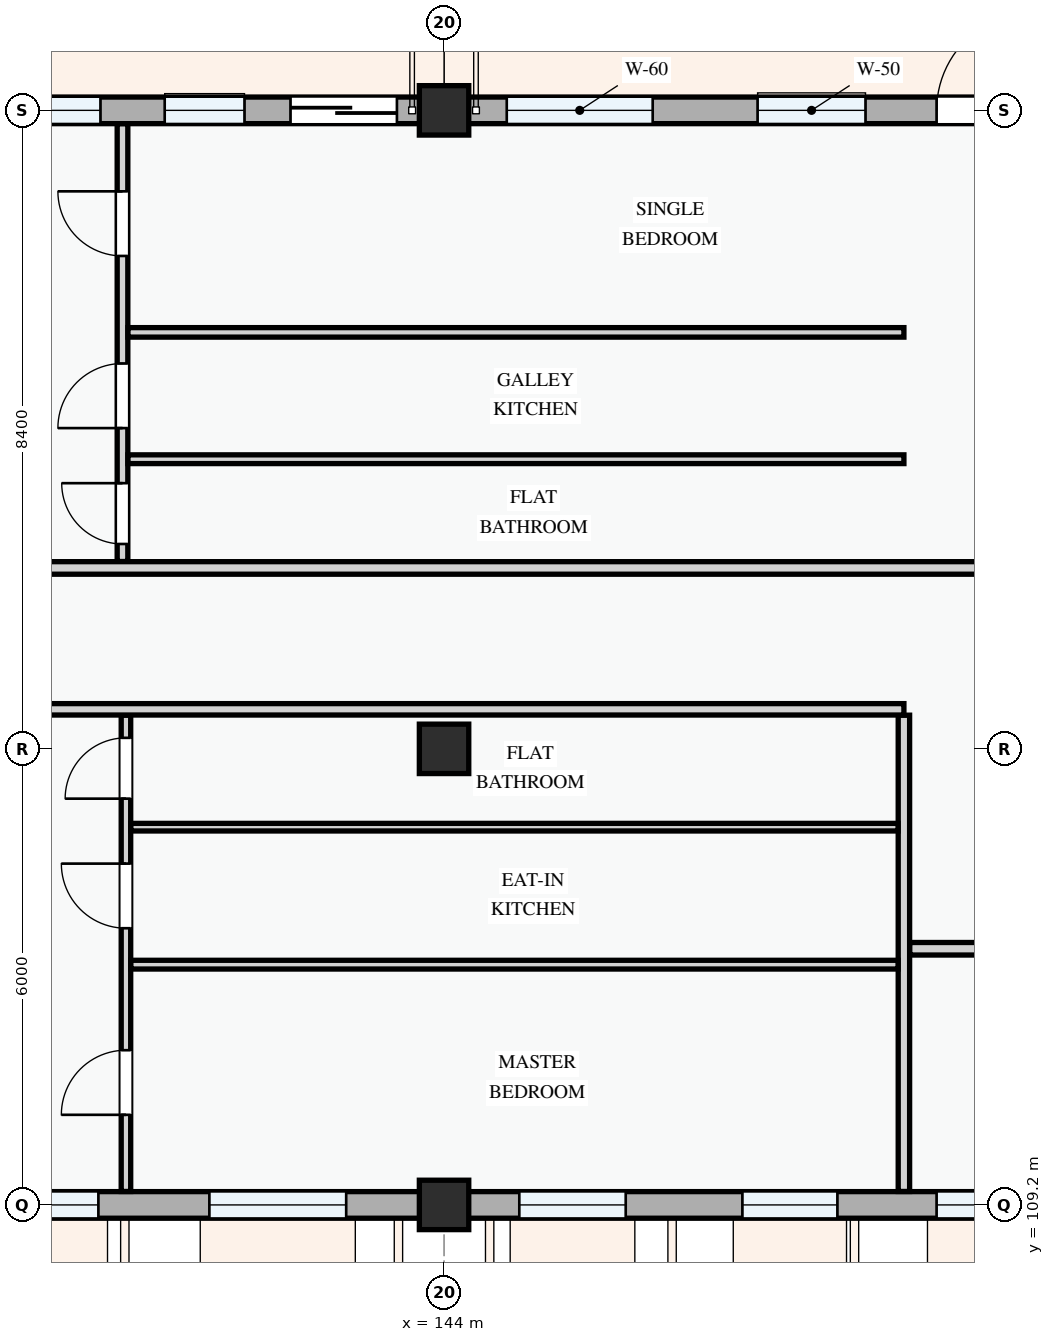
"""IFC4 building model, lengths in metres.
Left out: names, types, materials, properties, quantities, classifications, styles, units other than length and angle.
Written with IfcOpenShell. Run it as: python <this file> out.ifc"""

import sys

from ifc_helpers import new_model, si_unit, direction, frame, frame_2d, origin, origin_2d, place, context, subcontext, project, spatial, rectangle, extrude, element, fill, save


model = new_model("IFC4")
c1 = context("Model", 3, precision=1e-05, world=origin(), true_north=direction((0.0, 1.0)))
c2 = subcontext(c1, "Body", "Model", "MODEL_VIEW")
j1 = project(units=[si_unit("LENGTHUNIT", "METRE"), si_unit("PLANEANGLEUNIT", "RADIAN")], contexts=[c1])
p1 = place(None, origin())
s1 = spatial("IfcSite", under=j1, at=p1, CompositionType="ELEMENT")
p2 = place(p1, origin())
s2 = spatial("IfcBuilding", under=s1, at=p2, CompositionType="ELEMENT")
p3 = place(p2, frame((0.0, 0.0, 11.4)))
s3 = spatial("IfcBuildingStorey", under=s2, at=p3, CompositionType="ELEMENT", Elevation=11.4)
for number, where, z_axis, x_axis in (
    (1, (144.0, 109.2, 0.0), (0.0, 0.0, 1.0), (1.0, 0.0, 0.0)),
    (2, (144.0, 115.2, 0.0), (0.0, 0.0, 1.0), (1.0, 0.0, 0.0)),
    (3, (144.0, 123.6, 0.0), (0.0, 0.0, 1.0), (1.0, 0.0, 0.0)),
):
    element("IfcColumn", number, at=place(p3, frame(where, z_axis=z_axis, x_axis=x_axis)), inside=s3, PredefinedType="COLUMN", context=c2, shape_type="SweptSolid", body=[
        extrude(rectangle(XDim=0.65, YDim=0.65, at=origin_2d()), origin(), (0.0, 0.0, 1.0), 3.3),
    ])
p4 = place(p3, frame((152.4, 123.6, 0.0), z_axis=(0.0, 0.0, 1.0), x_axis=(-1.0, 0.0, 0.0)))
e4 = element("IfcWall", 4, at=p4, inside=s3, PredefinedType="STANDARD", context=c2, shape_type="SweptSolid", body=[
    extrude(rectangle(XDim=8.4, YDim=0.35, at=frame_2d((4.2, 0.0))), origin(), (0.0, 0.0, 1.0), 2.375),
])
p5 = place(p4, frame((0.62, 0.0, 0.0)))
e5 = element("IfcOpeningElement", 5, at=p5, cuts=e4, PredefinedType="OPENING", context=c2, shape_type="SweptSolid", body=[
    extrude(rectangle(XDim=1.3, YDim=2.15, at=frame_2d((0.65, 1.075))), frame((0.0, 0.185, 0.0), z_axis=(0.0, -1.0, 0.0), x_axis=(1.0, 0.0, 0.0)), (0.0, 0.0, 1.0), 0.37),
])
p6 = place(p4, frame((2.855, 0.0, 0.78)))
e6 = element("IfcOpeningElement", 6, at=p6, cuts=e4, PredefinedType="OPENING", context=c2, shape_type="SweptSolid", body=[
    extrude(rectangle(XDim=1.42, YDim=1.38, at=frame_2d((0.71, 0.69))), frame((0.0, 0.185, 0.0), z_axis=(0.0, -1.0, 0.0), x_axis=(1.0, 0.0, 0.0)), (0.0, 0.0, 1.0), 0.37),
])
p7 = place(p4, frame((5.655, 0.0, 0.78)))
e7 = element("IfcOpeningElement", 7, at=p7, cuts=e4, PredefinedType="OPENING", context=c2, shape_type="SweptSolid", body=[
    extrude(rectangle(XDim=1.92, YDim=1.44, at=frame_2d((0.96, 0.72))), frame((0.0, 0.185, 0.0), z_axis=(0.0, -1.0, 0.0), x_axis=(1.0, 0.0, 0.0)), (0.0, 0.0, 1.0), 0.37),
])
p8 = place(p3, frame((144.0, 123.6, 0.0), z_axis=(0.0, 0.0, 1.0), x_axis=(-1.0, 0.0, 0.0)))
e8 = element("IfcWall", 8, at=p8, inside=s3, PredefinedType="STANDARD", context=c2, shape_type="SweptSolid", body=[
    extrude(rectangle(XDim=6.0, YDim=0.35, at=frame_2d((3.0, 0.0))), origin(), (0.0, 0.0, 1.0), 2.475),
])
p9 = place(p8, frame((0.62, 0.0, 0.0)))
e9 = element("IfcOpeningElement", 9, at=p9, cuts=e8, PredefinedType="OPENING", context=c2, shape_type="SweptSolid", body=[
    extrude(rectangle(XDim=1.4, YDim=2.2, at=frame_2d((0.7, 1.1))), frame((0.0, 0.185, 0.0), z_axis=(0.0, -1.0, 0.0), x_axis=(1.0, 0.0, 0.0)), (0.0, 0.0, 1.0), 0.37),
])
p10 = place(p8, frame((2.625, 0.0, 0.78)))
e10 = element("IfcOpeningElement", 10, at=p10, cuts=e8, PredefinedType="OPENING", context=c2, shape_type="SweptSolid", body=[
    extrude(rectangle(XDim=1.05, YDim=1.2, at=frame_2d((0.525, 0.6))), frame((0.0, 0.185, 0.0), z_axis=(0.0, -1.0, 0.0), x_axis=(1.0, 0.0, 0.0)), (0.0, 0.0, 1.0), 0.37),
])
p11 = place(p8, frame((4.52, 0.0, 0.78)))
e11 = element("IfcOpeningElement", 11, at=p11, cuts=e8, PredefinedType="OPENING", context=c2, shape_type="SweptSolid", body=[
    extrude(rectangle(XDim=1.0, YDim=1.25, at=frame_2d((0.5, 0.625))), frame((0.0, 0.185, 0.0), z_axis=(0.0, -1.0, 0.0), x_axis=(1.0, 0.0, 0.0)), (0.0, 0.0, 1.0), 0.37),
])
p12 = place(p3, frame((138.0, 109.2, 0.0), z_axis=(0.0, 0.0, 1.0), x_axis=(1.0, 0.0, 0.0)))
e12 = element("IfcWall", 12, at=p12, inside=s3, PredefinedType="STANDARD", context=c2, shape_type="SweptSolid", body=[
    extrude(rectangle(XDim=6.0, YDim=0.35, at=frame_2d((3.0, 0.0))), origin(), (0.0, 0.0, 1.0), 2.475),
])
p13 = place(p12, frame((0.552, 0.0, 0.78)))
e13 = element("IfcOpeningElement", 13, at=p13, cuts=e12, PredefinedType="OPENING", context=c2, shape_type="SweptSolid", body=[
    extrude(rectangle(XDim=0.9, YDim=1.2, at=frame_2d((0.45, 0.6))), frame((0.0, 0.185, 0.0), z_axis=(0.0, -1.0, 0.0), x_axis=(1.0, 0.0, 0.0)), (0.0, 0.0, 1.0), 0.37),
])
p14 = place(p12, frame((2.913, 0.0, 0.78)))
e14 = element("IfcOpeningElement", 14, at=p14, cuts=e12, PredefinedType="OPENING", context=c2, shape_type="SweptSolid", body=[
    extrude(rectangle(XDim=1.8, YDim=1.5, at=frame_2d((0.9, 0.75))), frame((0.0, 0.185, 0.0), z_axis=(0.0, -1.0, 0.0), x_axis=(1.0, 0.0, 0.0)), (0.0, 0.0, 1.0), 0.37),
])
p15 = place(p3, frame((144.0, 109.2, 0.0), z_axis=(0.0, 0.0, 1.0), x_axis=(1.0, 0.0, 0.0)))
e15 = element("IfcWall", 15, at=p15, inside=s3, PredefinedType="STANDARD", context=c2, shape_type="SweptSolid", body=[
    extrude(rectangle(XDim=8.4, YDim=0.35, at=frame_2d((4.2, 0.0))), origin(), (0.0, 0.0, 1.0), 2.375),
])
p16 = place(p15, frame((0.99, 0.0, 0.78)))
e16 = element("IfcOpeningElement", 16, at=p16, cuts=e15, PredefinedType="OPENING", context=c2, shape_type="SweptSolid", body=[
    extrude(rectangle(XDim=1.4, YDim=1.45, at=frame_2d((0.7, 0.725))), frame((0.0, 0.185, 0.0), z_axis=(0.0, -1.0, 0.0), x_axis=(1.0, 0.0, 0.0)), (0.0, 0.0, 1.0), 0.37),
])
p17 = place(p15, frame((3.925, 0.0, 0.78)))
e17 = element("IfcOpeningElement", 17, at=p17, cuts=e15, PredefinedType="OPENING", context=c2, shape_type="SweptSolid", body=[
    extrude(rectangle(XDim=1.25, YDim=1.45, at=frame_2d((0.625, 0.725))), frame((0.0, 0.185, 0.0), z_axis=(0.0, -1.0, 0.0), x_axis=(1.0, 0.0, 0.0)), (0.0, 0.0, 1.0), 0.37),
])
p18 = place(p15, frame((6.48, 0.0, 0.78)))
e18 = element("IfcOpeningElement", 18, at=p18, cuts=e15, PredefinedType="OPENING", context=c2, shape_type="SweptSolid", body=[
    extrude(rectangle(XDim=1.3, YDim=1.4, at=frame_2d((0.65, 0.7))), frame((0.0, 0.185, 0.0), z_axis=(0.0, -1.0, 0.0), x_axis=(1.0, 0.0, 0.0)), (0.0, 0.0, 1.0), 0.37),
])
p19 = place(p3, frame((150.05, 109.377, 0.0), z_axis=(0.0, 0.0, 1.0), x_axis=(0.0, 1.0, 0.0)))
e19 = element("IfcWall", 19, at=p19, inside=s3, PredefinedType="PARTITIONING", context=c2, shape_type="SweptSolid", body=[
    extrude(rectangle(XDim=6.266, YDim=0.15, at=frame_2d((3.133, 0.0))), origin(), (0.0, 0.0, 1.0), 3.0),
])
p20 = place(p3, frame((150.127, 112.57, 0.0), z_axis=(0.0, 0.0, 1.0), x_axis=(1.0, 0.0, 0.0)))
e20 = element("IfcWall", 20, at=p20, inside=s3, PredefinedType="PARTITIONING", context=c2, shape_type="SweptSolid", body=[
    extrude(rectangle(XDim=2.413, YDim=0.165, at=frame_2d((1.207, 0.0))), origin(), (0.0, 0.0, 1.0), 3.0),
])
p21 = place(p3, frame((139.815, 109.377, 0.0), z_axis=(0.0, 0.0, 1.0), x_axis=(0.0, 1.0, 0.0)))
e21 = element("IfcWall", 21, at=p21, inside=s3, PredefinedType="PARTITIONING", context=c2, shape_type="SweptSolid", body=[
    extrude(rectangle(XDim=6.266, YDim=0.125, at=frame_2d((3.133, 0.0))), origin(), (0.0, 0.0, 1.0), 3.0),
])
p22 = place(p21, frame((1.008, 0.0, 0.0)))
e22 = element("IfcOpeningElement", 22, at=p22, cuts=e21, PredefinedType="OPENING", context=c2, shape_type="SweptSolid", body=[
    extrude(rectangle(XDim=0.85, YDim=2.1, at=frame_2d((0.425, 1.05))), frame((0.0, 0.073, 0.0), z_axis=(0.0, -1.0, 0.0), x_axis=(1.0, 0.0, 0.0)), (0.0, 0.0, 1.0), 0.145),
])
p23 = place(p21, frame((3.463, 0.0, 0.0)))
e23 = element("IfcOpeningElement", 23, at=p23, cuts=e21, PredefinedType="OPENING", context=c2, shape_type="SweptSolid", body=[
    extrude(rectangle(XDim=0.85, YDim=2.1, at=frame_2d((0.425, 1.05))), frame((0.0, 0.073, 0.0), z_axis=(0.0, -1.0, 0.0), x_axis=(1.0, 0.0, 0.0)), (0.0, 0.0, 1.0), 0.145),
])
p24 = place(p21, frame((5.168, 0.0, 0.0)))
e24 = element("IfcOpeningElement", 24, at=p24, cuts=e21, PredefinedType="OPENING", context=c2, shape_type="SweptSolid", body=[
    extrude(rectangle(XDim=0.8, YDim=2.1, at=frame_2d((0.4, 1.05))), frame((0.0, 0.073, 0.0), z_axis=(0.0, -1.0, 0.0), x_axis=(1.0, 0.0, 0.0)), (0.0, 0.0, 1.0), 0.145),
])
p25 = place(p3, frame((139.879, 112.361, 0.0), z_axis=(0.0, 0.0, 1.0), x_axis=(1.0, 0.0, 0.0)))
e25 = element("IfcWall", 25, at=p25, inside=s3, PredefinedType="PARTITIONING", context=c2, shape_type="SweptSolid", body=[
    extrude(rectangle(XDim=10.094, YDim=0.115, at=frame_2d((5.047, 0.0))), origin(), (0.0, 0.0, 1.0), 3.0),
])
p26 = place(p3, frame((139.879, 114.17, 0.0), z_axis=(0.0, 0.0, 1.0), x_axis=(1.0, 0.0, 0.0)))
e26 = element("IfcWall", 26, at=p26, inside=s3, PredefinedType="PARTITIONING", context=c2, shape_type="SweptSolid", body=[
    extrude(rectangle(XDim=10.094, YDim=0.1, at=frame_2d((5.047, 0.0))), origin(), (0.0, 0.0, 1.0), 3.0),
])
p27 = place(p3, frame((139.77, 117.665, 0.0), z_axis=(0.0, 0.0, 1.0), x_axis=(0.0, 1.0, 0.0)))
e27 = element("IfcWall", 27, at=p27, inside=s3, PredefinedType="PARTITIONING", context=c2, shape_type="SweptSolid", body=[
    extrude(rectangle(XDim=5.759, YDim=0.14, at=frame_2d((2.879, 0.0))), origin(), (0.0, 0.0, 1.0), 3.0),
])
p28 = place(p27, frame((0.231, 0.0, 0.0)))
e28 = element("IfcOpeningElement", 28, at=p28, cuts=e27, PredefinedType="OPENING", context=c2, shape_type="SweptSolid", body=[
    extrude(rectangle(XDim=0.8, YDim=2.1, at=frame_2d((0.4, 1.05))), frame((0.0, 0.08, 0.0), z_axis=(0.0, -1.0, 0.0), x_axis=(1.0, 0.0, 0.0)), (0.0, 0.0, 1.0), 0.16),
])
p29 = place(p27, frame((1.755, 0.0, 0.0)))
e29 = element("IfcOpeningElement", 29, at=p29, cuts=e27, PredefinedType="OPENING", context=c2, shape_type="SweptSolid", body=[
    extrude(rectangle(XDim=0.85, YDim=2.1, at=frame_2d((0.425, 1.05))), frame((0.0, 0.08, 0.0), z_axis=(0.0, -1.0, 0.0), x_axis=(1.0, 0.0, 0.0)), (0.0, 0.0, 1.0), 0.16),
])
p30 = place(p27, frame((4.02, 0.0, 0.0)))
e30 = element("IfcOpeningElement", 30, at=p30, cuts=e27, PredefinedType="OPENING", context=c2, shape_type="SweptSolid", body=[
    extrude(rectangle(XDim=0.85, YDim=2.1, at=frame_2d((0.425, 1.05))), frame((0.0, 0.08, 0.0), z_axis=(0.0, -1.0, 0.0), x_axis=(1.0, 0.0, 0.0)), (0.0, 0.0, 1.0), 0.16),
])
p31 = place(p3, frame((139.842, 120.679, 0.0), z_axis=(0.0, 0.0, 1.0), x_axis=(1.0, 0.0, 0.0)))
e31 = element("IfcWall", 31, at=p31, inside=s3, PredefinedType="PARTITIONING", context=c2, shape_type="SweptSolid", body=[
    extrude(rectangle(XDim=10.208, YDim=0.125, at=frame_2d((5.104, 0.0))), origin(), (0.0, 0.0, 1.0), 3.0),
])
p32 = place(p3, frame((139.842, 119.01, 0.0), z_axis=(0.0, 0.0, 1.0), x_axis=(1.0, 0.0, 0.0)))
e32 = element("IfcWall", 32, at=p32, inside=s3, PredefinedType="PARTITIONING", context=c2, shape_type="SweptSolid", body=[
    extrude(rectangle(XDim=10.208, YDim=0.115, at=frame_2d((5.104, 0.0))), origin(), (0.0, 0.0, 1.0), 3.0),
])
p33 = place(p3, frame((80.577, 115.72, 0.0), z_axis=(0.0, 0.0, 1.0), x_axis=(1.0, 0.0, 0.0)))
e33 = element("IfcWall", 33, at=p33, inside=s3, PredefinedType="PARTITIONING", context=c2, shape_type="SweptSolid", body=[
    extrude(rectangle(XDim=69.473, YDim=0.15, at=frame_2d((34.737, 0.0))), origin(), (0.0, 0.0, 1.0), 3.0),
])
p34 = place(p33, frame((9.531, 0.0, 0.0)))
e34 = element("IfcOpeningElement", 34, at=p34, cuts=e33, PredefinedType="OPENING", context=c2, shape_type="SweptSolid", body=[
    extrude(rectangle(XDim=0.92, YDim=2.1, at=frame_2d((0.46, 1.05))), frame((0.0, 0.085, 0.0), z_axis=(0.0, -1.0, 0.0), x_axis=(1.0, 0.0, 0.0)), (0.0, 0.0, 1.0), 0.17),
])
p35 = place(p33, frame((23.793, 0.0, 0.0)))
e35 = element("IfcOpeningElement", 35, at=p35, cuts=e33, PredefinedType="OPENING", context=c2, shape_type="SweptSolid", body=[
    extrude(rectangle(XDim=0.92, YDim=2.1, at=frame_2d((0.46, 1.05))), frame((0.0, 0.085, 0.0), z_axis=(0.0, -1.0, 0.0), x_axis=(1.0, 0.0, 0.0)), (0.0, 0.0, 1.0), 0.17),
])
p36 = place(p33, frame((52.74, 0.0, 0.0)))
e36 = element("IfcOpeningElement", 36, at=p36, cuts=e33, PredefinedType="OPENING", context=c2, shape_type="SweptSolid", body=[
    extrude(rectangle(XDim=0.92, YDim=2.1, at=frame_2d((0.46, 1.05))), frame((0.0, 0.085, 0.0), z_axis=(0.0, -1.0, 0.0), x_axis=(1.0, 0.0, 0.0)), (0.0, 0.0, 1.0), 0.17),
])
p37 = place(p3, frame((80.577, 117.58, 0.0), z_axis=(0.0, 0.0, 1.0), x_axis=(1.0, 0.0, 0.0)))
e37 = element("IfcWall", 37, at=p37, inside=s3, PredefinedType="PARTITIONING", context=c2, shape_type="SweptSolid", body=[
    extrude(rectangle(XDim=71.963, YDim=0.165, at=frame_2d((35.981, 0.0))), origin(), (0.0, 0.0, 1.0), 3.0),
])
p38 = place(p37, frame((9.411, 0.0, 0.0)))
e38 = element("IfcOpeningElement", 38, at=p38, cuts=e37, PredefinedType="OPENING", context=c2, shape_type="SweptSolid", body=[
    extrude(rectangle(XDim=0.96, YDim=2.12, at=frame_2d((0.48, 1.06))), frame((0.0, 0.093, 0.0), z_axis=(0.0, -1.0, 0.0), x_axis=(1.0, 0.0, 0.0)), (0.0, 0.0, 1.0), 0.185),
])
p39 = place(p37, frame((23.793, 0.0, 0.0)))
e39 = element("IfcOpeningElement", 39, at=p39, cuts=e37, PredefinedType="OPENING", context=c2, shape_type="SweptSolid", body=[
    extrude(rectangle(XDim=0.92, YDim=2.1, at=frame_2d((0.46, 1.05))), frame((0.0, 0.093, 0.0), z_axis=(0.0, -1.0, 0.0), x_axis=(1.0, 0.0, 0.0)), (0.0, 0.0, 1.0), 0.185),
])
p40 = place(p37, frame((52.718, 0.0, 0.0)))
e40 = element("IfcOpeningElement", 40, at=p40, cuts=e37, PredefinedType="OPENING", context=c2, shape_type="SweptSolid", body=[
    extrude(rectangle(XDim=0.92, YDim=2.1, at=frame_2d((0.46, 1.05))), frame((0.0, 0.093, 0.0), z_axis=(0.0, -1.0, 0.0), x_axis=(1.0, 0.0, 0.0)), (0.0, 0.0, 1.0), 0.185),
])
p41 = place(p5, frame((1.3, 0.0, 0.0), z_axis=(0.0, 0.0, 1.0), x_axis=(-1.0, 0.0, 0.0)))
e41 = element("IfcDoor", 41, at=p41, inside=s3, OperationType="SINGLE_SWING_RIGHT", PredefinedType="DOOR", context=c2, shape_type="SweptSolid", body=[
    extrude(rectangle(XDim=1.3, YDim=2.15, at=frame_2d((0.65, 1.075))), frame((0.0, 0.025, 0.0), z_axis=(0.0, -1.0, 0.0), x_axis=(1.0, 0.0, 0.0)), (0.0, 0.0, 1.0), 0.05),
])
fill(e5, e41)
p42 = place(p6, origin())
e42 = element("IfcWindow", 42, at=p42, inside=s3, PartitioningType="SINGLE_PANEL", PredefinedType="WINDOW", context=c2, shape_type="SweptSolid", body=[
    extrude(rectangle(XDim=1.42, YDim=1.38, at=frame_2d((0.71, 0.69))), frame((0.0, 0.03, 0.0), z_axis=(0.0, -1.0, 0.0), x_axis=(1.0, 0.0, 0.0)), (0.0, 0.0, 1.0), 0.06),
])
fill(e6, e42)
p43 = place(p7, origin())
e43 = element("IfcWindow", 43, at=p43, inside=s3, PartitioningType="DOUBLE_PANEL_VERTICAL", PredefinedType="WINDOW", context=c2, shape_type="SweptSolid", body=[
    extrude(rectangle(XDim=1.92, YDim=1.44, at=frame_2d((0.96, 0.72))), frame((0.0, 0.03, 0.0), z_axis=(0.0, -1.0, 0.0), x_axis=(1.0, 0.0, 0.0)), (0.0, 0.0, 1.0), 0.06),
])
fill(e7, e43)
p44 = place(p9, frame((1.4, 0.0, 0.0), z_axis=(0.0, 0.0, 1.0), x_axis=(-1.0, 0.0, 0.0)))
e44 = element("IfcDoor", 44, at=p44, inside=s3, OperationType="SLIDING_TO_LEFT", PredefinedType="DOOR", context=c2, shape_type="SweptSolid", body=[
    extrude(rectangle(XDim=1.4, YDim=2.2, at=frame_2d((0.7, 1.1))), frame((0.0, 0.025, 0.0), z_axis=(0.0, -1.0, 0.0), x_axis=(1.0, 0.0, 0.0)), (0.0, 0.0, 1.0), 0.05),
])
fill(e9, e44)
p45 = place(p10, origin())
e45 = element("IfcWindow", 45, at=p45, inside=s3, PartitioningType="SINGLE_PANEL", PredefinedType="WINDOW", context=c2, shape_type="SweptSolid", body=[
    extrude(rectangle(XDim=1.05, YDim=1.2, at=frame_2d((0.525, 0.6))), frame((0.0, 0.03, 0.0), z_axis=(0.0, -1.0, 0.0), x_axis=(1.0, 0.0, 0.0)), (0.0, 0.0, 1.0), 0.06),
])
fill(e10, e45)
p46 = place(p11, origin())
e46 = element("IfcWindow", 46, at=p46, inside=s3, PartitioningType="SINGLE_PANEL", PredefinedType="WINDOW", context=c2, shape_type="SweptSolid", body=[
    extrude(rectangle(XDim=1.0, YDim=1.25, at=frame_2d((0.5, 0.625))), frame((0.0, 0.03, 0.0), z_axis=(0.0, -1.0, 0.0), x_axis=(1.0, 0.0, 0.0)), (0.0, 0.0, 1.0), 0.06),
])
fill(e11, e46)
p47 = place(p13, origin())
e47 = element("IfcWindow", 47, at=p47, inside=s3, PartitioningType="SINGLE_PANEL", PredefinedType="WINDOW", context=c2, shape_type="SweptSolid", body=[
    extrude(rectangle(XDim=0.9, YDim=1.2, at=frame_2d((0.45, 0.6))), frame((0.0, 0.03, 0.0), z_axis=(0.0, -1.0, 0.0), x_axis=(1.0, 0.0, 0.0)), (0.0, 0.0, 1.0), 0.06),
])
fill(e13, e47)
p48 = place(p14, origin())
e48 = element("IfcWindow", 48, at=p48, inside=s3, PartitioningType="DOUBLE_PANEL_VERTICAL", PredefinedType="WINDOW", context=c2, shape_type="SweptSolid", body=[
    extrude(rectangle(XDim=1.8, YDim=1.5, at=frame_2d((0.9, 0.75))), frame((0.0, 0.03, 0.0), z_axis=(0.0, -1.0, 0.0), x_axis=(1.0, 0.0, 0.0)), (0.0, 0.0, 1.0), 0.06),
])
fill(e14, e48)
p49 = place(p16, origin())
e49 = element("IfcWindow", 49, at=p49, inside=s3, PartitioningType="SINGLE_PANEL", PredefinedType="WINDOW", context=c2, shape_type="SweptSolid", body=[
    extrude(rectangle(XDim=1.4, YDim=1.45, at=frame_2d((0.7, 0.725))), frame((0.0, 0.03, 0.0), z_axis=(0.0, -1.0, 0.0), x_axis=(1.0, 0.0, 0.0)), (0.0, 0.0, 1.0), 0.06),
])
fill(e16, e49)
p50 = place(p17, origin())
e50 = element("IfcWindow", 50, at=p50, inside=s3, PartitioningType="SINGLE_PANEL", PredefinedType="WINDOW", context=c2, shape_type="SweptSolid", body=[
    extrude(rectangle(XDim=1.25, YDim=1.45, at=frame_2d((0.625, 0.725))), frame((0.0, 0.03, 0.0), z_axis=(0.0, -1.0, 0.0), x_axis=(1.0, 0.0, 0.0)), (0.0, 0.0, 1.0), 0.06),
])
fill(e17, e50)
p51 = place(p18, origin())
e51 = element("IfcWindow", 51, at=p51, inside=s3, PartitioningType="SINGLE_PANEL", PredefinedType="WINDOW", context=c2, shape_type="SweptSolid", body=[
    extrude(rectangle(XDim=1.3, YDim=1.4, at=frame_2d((0.65, 0.7))), frame((0.0, 0.03, 0.0), z_axis=(0.0, -1.0, 0.0), x_axis=(1.0, 0.0, 0.0)), (0.0, 0.0, 1.0), 0.06),
])
fill(e18, e51)
p52 = place(p22, origin())
e52 = element("IfcDoor", 52, at=p52, inside=s3, OperationType="SINGLE_SWING_LEFT", PredefinedType="DOOR", context=c2, shape_type="SweptSolid", body=[
    extrude(rectangle(XDim=0.85, YDim=2.1, at=frame_2d((0.425, 1.05))), frame((0.0, 0.025, 0.0), z_axis=(0.0, -1.0, 0.0), x_axis=(1.0, 0.0, 0.0)), (0.0, 0.0, 1.0), 0.05),
])
fill(e22, e52)
p53 = place(p23, origin())
e53 = element("IfcDoor", 53, at=p53, inside=s3, OperationType="SINGLE_SWING_RIGHT", PredefinedType="DOOR", context=c2, shape_type="SweptSolid", body=[
    extrude(rectangle(XDim=0.85, YDim=2.1, at=frame_2d((0.425, 1.05))), frame((0.0, 0.025, 0.0), z_axis=(0.0, -1.0, 0.0), x_axis=(1.0, 0.0, 0.0)), (0.0, 0.0, 1.0), 0.05),
])
fill(e23, e53)
p54 = place(p24, origin())
e54 = element("IfcDoor", 54, at=p54, inside=s3, OperationType="SINGLE_SWING_LEFT", PredefinedType="DOOR", context=c2, shape_type="SweptSolid", body=[
    extrude(rectangle(XDim=0.8, YDim=2.1, at=frame_2d((0.4, 1.05))), frame((0.0, 0.025, 0.0), z_axis=(0.0, -1.0, 0.0), x_axis=(1.0, 0.0, 0.0)), (0.0, 0.0, 1.0), 0.05),
])
fill(e24, e54)
p55 = place(p28, origin())
e55 = element("IfcDoor", 55, at=p55, inside=s3, OperationType="SINGLE_SWING_RIGHT", PredefinedType="DOOR", context=c2, shape_type="SweptSolid", body=[
    extrude(rectangle(XDim=0.8, YDim=2.1, at=frame_2d((0.4, 1.05))), frame((0.0, 0.025, 0.0), z_axis=(0.0, -1.0, 0.0), x_axis=(1.0, 0.0, 0.0)), (0.0, 0.0, 1.0), 0.05),
])
fill(e28, e55)
p56 = place(p29, origin())
e56 = element("IfcDoor", 56, at=p56, inside=s3, OperationType="SINGLE_SWING_LEFT", PredefinedType="DOOR", context=c2, shape_type="SweptSolid", body=[
    extrude(rectangle(XDim=0.85, YDim=2.1, at=frame_2d((0.425, 1.05))), frame((0.0, 0.025, 0.0), z_axis=(0.0, -1.0, 0.0), x_axis=(1.0, 0.0, 0.0)), (0.0, 0.0, 1.0), 0.05),
])
fill(e29, e56)
p57 = place(p30, origin())
e57 = element("IfcDoor", 57, at=p57, inside=s3, OperationType="SINGLE_SWING_RIGHT", PredefinedType="DOOR", context=c2, shape_type="SweptSolid", body=[
    extrude(rectangle(XDim=0.85, YDim=2.1, at=frame_2d((0.425, 1.05))), frame((0.0, 0.025, 0.0), z_axis=(0.0, -1.0, 0.0), x_axis=(1.0, 0.0, 0.0)), (0.0, 0.0, 1.0), 0.05),
])
fill(e30, e57)
save(model, sys.argv[1])
